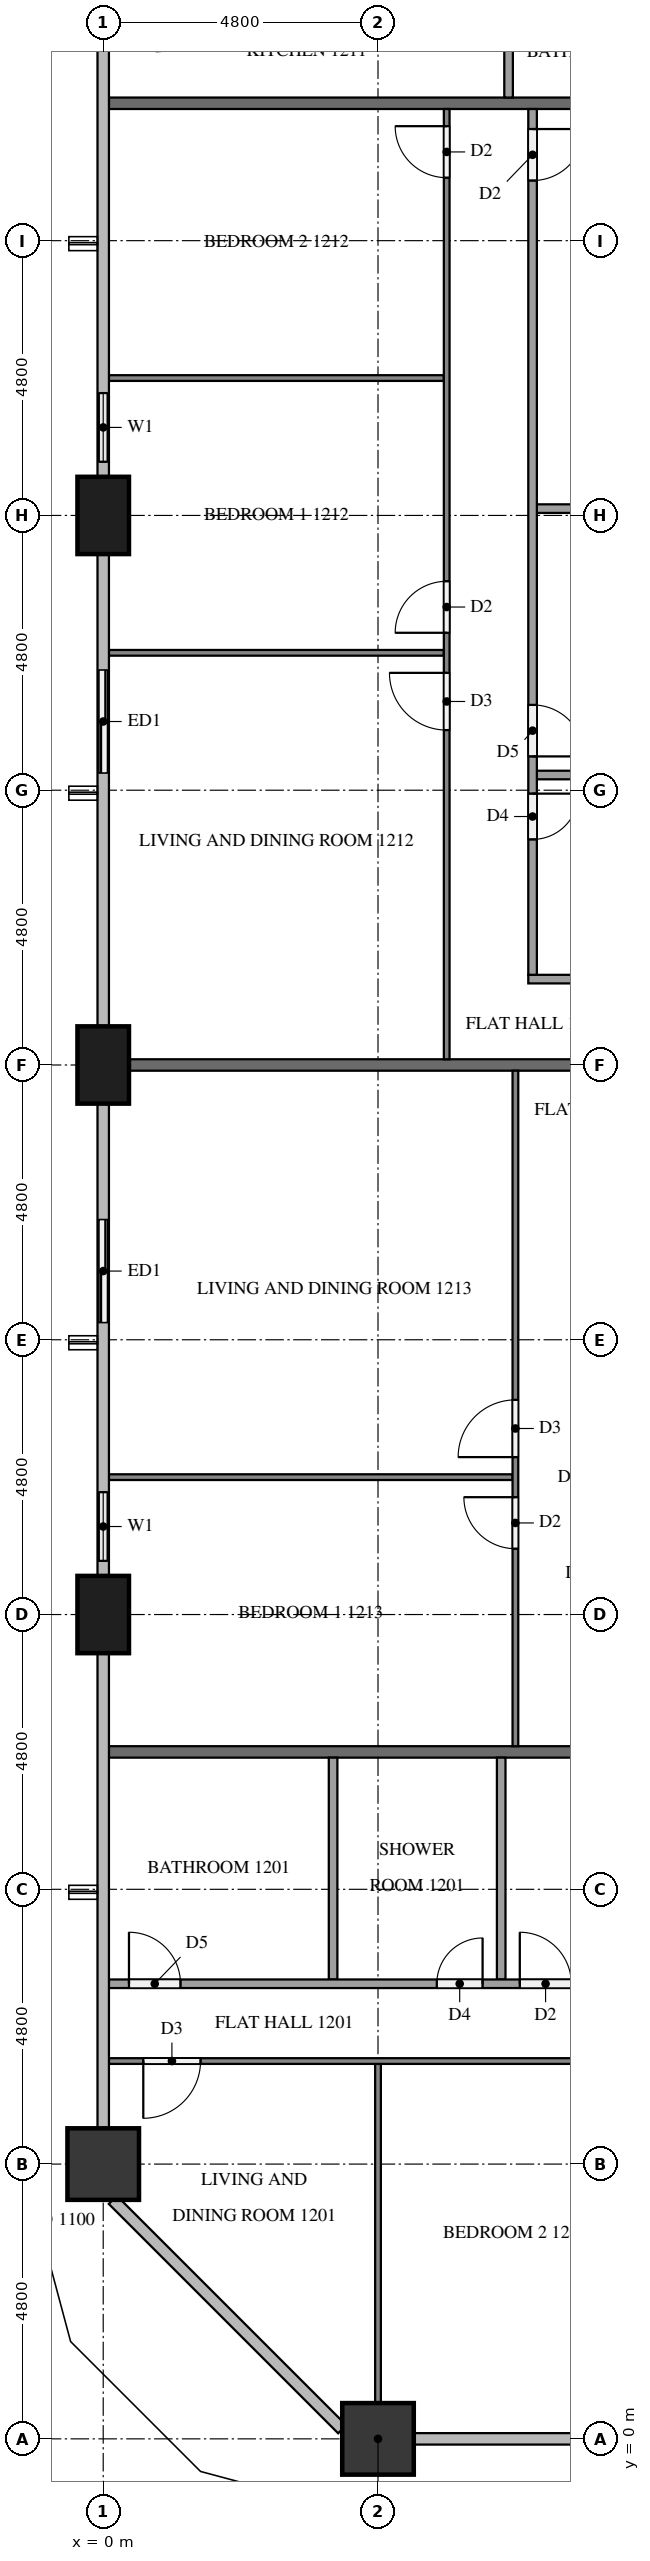
"""IFC4 building model, lengths in metres.
Left out: names, types, materials, properties, quantities, classifications, styles, units other than length and angle.
Written with IfcOpenShell. Run it as: python <this file> out.ifc"""

import sys

from ifc_helpers import new_model, si_unit, direction, frame, frame_2d, origin, origin_2d, place, context, subcontext, project, spatial, rectangle, extrude, element, fill, save


model = new_model("IFC4")
c1 = context("Model", 3, precision=1e-05, world=origin(), true_north=direction((0.0, 1.0)))
c2 = subcontext(c1, "Body", "Model", "MODEL_VIEW")
j1 = project(units=[si_unit("LENGTHUNIT", "METRE"), si_unit("PLANEANGLEUNIT", "RADIAN")], contexts=[c1])
p1 = place(None, origin())
s1 = spatial("IfcSite", under=j1, at=p1, CompositionType="ELEMENT")
p2 = place(p1, origin())
s2 = spatial("IfcBuilding", under=s1, at=p2, CompositionType="ELEMENT")
p3 = place(p2, frame((0.0, 0.0, 50.4)))
s3 = spatial("IfcBuildingStorey", under=s2, at=p3, CompositionType="ELEMENT", Elevation=50.4)
p4 = place(p3, frame((4.8, 0.0, 0.0), z_axis=(0.0, 0.0, 1.0), x_axis=(1.0, 0.0, 0.0)))
e1 = element("IfcColumn", 1, at=p4, inside=s3, PredefinedType="COLUMN", context=c2, shape_type="SweptSolid", body=[
    extrude(rectangle(XDim=1.25, YDim=1.25, at=origin_2d()), origin(), (0.0, 0.0, 1.0), 3.1),
])
for number, where, z_axis, x_axis in (
    (2, (0.0, 33.6, 0.0), (0.0, 0.0, 1.0), (0.0, 1.0, 0.0)),
    (3, (0.0, 24.0, 0.0), (0.0, 0.0, 1.0), (0.0, 1.0, 0.0)),
    (4, (0.0, 14.4, 0.0), (0.0, 0.0, 1.0), (0.0, 1.0, 0.0)),
):
    element("IfcColumn", number, at=place(p3, frame(where, z_axis=z_axis, x_axis=x_axis)), inside=s3, PredefinedType="COLUMN", context=c2, shape_type="SweptSolid", body=[
        extrude(rectangle(XDim=1.35, YDim=0.9, at=origin_2d()), origin(), (0.0, 0.0, 1.0), 3.1),
    ])
p5 = place(p3, frame((0.0, 4.8, 0.0), z_axis=(0.0, 0.0, 1.0), x_axis=(1.0, 0.0, 0.0)))
e5 = element("IfcColumn", 5, at=p5, inside=s3, PredefinedType="COLUMN", context=c2, shape_type="SweptSolid", body=[
    extrude(rectangle(XDim=1.25, YDim=1.25, at=origin_2d()), origin(), (0.0, 0.0, 1.0), 3.1),
])
p6 = place(p3, frame((0.0, 36.0, 0.0), z_axis=(0.0, 0.0, 1.0), x_axis=(0.0, -1.0, 0.0)))
e6 = element("IfcWall", 6, at=p6, inside=s3, PredefinedType="SOLIDWALL", context=c2, shape_type="SweptSolid", body=[
    extrude(rectangle(XDim=1.725, YDim=0.15, at=frame_2d((0.863, 0.0))), origin(), (0.0, 0.0, 1.0), 3.1),
])
p7 = place(p6, frame((0.262, 0.0, 0.9)))
e7 = element("IfcOpeningElement", 7, at=p7, cuts=e6, PredefinedType="OPENING", context=c2, shape_type="SweptSolid", body=[
    extrude(rectangle(XDim=1.2, YDim=1.4, at=frame_2d((0.6, 0.7))), frame((0.0, 0.085, 0.0), z_axis=(0.0, -1.0, 0.0), x_axis=(1.0, 0.0, 0.0)), (0.0, 0.0, 1.0), 0.17),
])
p8 = place(p3, frame((0.0, 31.2, 0.0), z_axis=(0.0, 0.0, 1.0), x_axis=(0.0, -1.0, 0.0)))
e8 = element("IfcWall", 8, at=p8, inside=s3, PredefinedType="SOLIDWALL", context=c2, shape_type="SweptSolid", body=[
    extrude(rectangle(XDim=2.4, YDim=0.15, at=frame_2d((1.2, 0.0))), origin(), (0.0, 0.0, 1.0), 3.1),
])
p9 = place(p8, frame((0.3, 0.0, 0.0)))
e9 = element("IfcOpeningElement", 9, at=p9, cuts=e8, PredefinedType="OPENING", context=c2, shape_type="SweptSolid", body=[
    extrude(rectangle(XDim=1.8, YDim=2.4, at=frame_2d((0.9, 1.2))), frame((0.0, 0.085, 0.0), z_axis=(0.0, -1.0, 0.0), x_axis=(1.0, 0.0, 0.0)), (0.0, 0.0, 1.0), 0.17),
])
p10 = place(p3, frame((0.0, 21.6, 0.0), z_axis=(0.0, 0.0, 1.0), x_axis=(0.0, -1.0, 0.0)))
e10 = element("IfcWall", 10, at=p10, inside=s3, PredefinedType="SOLIDWALL", context=c2, shape_type="SweptSolid", body=[
    extrude(rectangle(XDim=2.4, YDim=0.15, at=frame_2d((1.2, 0.0))), origin(), (0.0, 0.0, 1.0), 3.1),
])
p11 = place(p10, frame((0.3, 0.0, 0.0)))
e11 = element("IfcOpeningElement", 11, at=p11, cuts=e10, PredefinedType="OPENING", context=c2, shape_type="SweptSolid", body=[
    extrude(rectangle(XDim=1.8, YDim=2.4, at=frame_2d((0.9, 1.2))), frame((0.0, 0.085, 0.0), z_axis=(0.0, -1.0, 0.0), x_axis=(1.0, 0.0, 0.0)), (0.0, 0.0, 1.0), 0.17),
])
p12 = place(p3, frame((0.0, 16.8, 0.0), z_axis=(0.0, 0.0, 1.0), x_axis=(0.0, -1.0, 0.0)))
e12 = element("IfcWall", 12, at=p12, inside=s3, PredefinedType="SOLIDWALL", context=c2, shape_type="SweptSolid", body=[
    extrude(rectangle(XDim=1.725, YDim=0.15, at=frame_2d((0.863, 0.0))), origin(), (0.0, 0.0, 1.0), 3.1),
])
p13 = place(p12, frame((0.262, 0.0, 0.9)))
e13 = element("IfcOpeningElement", 13, at=p13, cuts=e12, PredefinedType="OPENING", context=c2, shape_type="SweptSolid", body=[
    extrude(rectangle(XDim=1.2, YDim=1.4, at=frame_2d((0.6, 0.7))), frame((0.0, 0.085, 0.0), z_axis=(0.0, -1.0, 0.0), x_axis=(1.0, 0.0, 0.0)), (0.0, 0.0, 1.0), 0.17),
])
for number, where, z_axis, x_axis in (
    (14, (0.1, 12.0, 0.0), (0.0, 0.0, 1.0), (1.0, 0.0, 0.0)),
    (15, (0.1, 40.8, 0.0), (0.0, 0.0, 1.0), (1.0, 0.0, 0.0)),
):
    element("IfcWall", number, at=place(p3, frame(where, z_axis=z_axis, x_axis=x_axis)), inside=s3, PredefinedType="PARTITIONING", context=c2, shape_type="SweptSolid", body=[
        extrude(rectangle(XDim=11.8, YDim=0.2, at=frame_2d((5.9, 0.0))), origin(), (0.0, 0.0, 1.0), 3.1),
    ])
p14 = place(p3, frame((0.45, 24.0, 0.0), z_axis=(0.0, 0.0, 1.0), x_axis=(1.0, 0.0, 0.0)))
e16 = element("IfcWall", 16, at=p14, inside=s3, PredefinedType="PARTITIONING", context=c2, shape_type="SweptSolid", body=[
    extrude(rectangle(XDim=11.45, YDim=0.2, at=frame_2d((5.725, 0.0))), origin(), (0.0, 0.0, 1.0), 3.1),
])
p15 = place(p3, frame((4.8, 6.55, 0.0), z_axis=(0.0, 0.0, 1.0), x_axis=(0.0, -1.0, 0.0)))
e17 = element("IfcWall", 17, at=p15, inside=s3, PredefinedType="PARTITIONING", context=c2, shape_type="SweptSolid", body=[
    extrude(rectangle(XDim=5.925, YDim=0.1, at=frame_2d((2.962, 0.0))), origin(), (0.0, 0.0, 1.0), 3.1),
])
p16 = place(p3, frame((14.3, 6.6, 0.0), z_axis=(0.0, 0.0, 1.0), x_axis=(-1.0, 0.0, 0.0)))
e18 = element("IfcWall", 18, at=p16, inside=s3, PredefinedType="PARTITIONING", context=c2, shape_type="SweptSolid", body=[
    extrude(rectangle(XDim=14.2, YDim=0.1, at=frame_2d((7.1, 0.0))), origin(), (0.0, 0.0, 1.0), 3.1),
])
p17 = place(p16, frame((3.45, 0.0, 0.0)))
e19 = element("IfcOpeningElement", 19, at=p17, cuts=e18, PredefinedType="OPENING", context=c2, shape_type="SweptSolid", body=[
    extrude(rectangle(XDim=0.9, YDim=2.1, at=frame_2d((0.45, 1.05))), frame((0.0, 0.06, 0.0), z_axis=(0.0, -1.0, 0.0), x_axis=(1.0, 0.0, 0.0)), (0.0, 0.0, 1.0), 0.12),
])
p18 = place(p16, frame((5.05, 0.0, 0.0)))
e20 = element("IfcOpeningElement", 20, at=p18, cuts=e18, PredefinedType="OPENING", context=c2, shape_type="SweptSolid", body=[
    extrude(rectangle(XDim=0.9, YDim=2.1, at=frame_2d((0.45, 1.05))), frame((0.0, 0.06, 0.0), z_axis=(0.0, -1.0, 0.0), x_axis=(1.0, 0.0, 0.0)), (0.0, 0.0, 1.0), 0.12),
])
p19 = place(p16, frame((12.6, 0.0, 0.0)))
e21 = element("IfcOpeningElement", 21, at=p19, cuts=e18, PredefinedType="OPENING", context=c2, shape_type="SweptSolid", body=[
    extrude(rectangle(XDim=1.0, YDim=2.1, at=frame_2d((0.5, 1.05))), frame((0.0, 0.06, 0.0), z_axis=(0.0, -1.0, 0.0), x_axis=(1.0, 0.0, 0.0)), (0.0, 0.0, 1.0), 0.12),
])
for number, where, z_axis, x_axis in (
    (22, (6.952, 11.9, 0.0), (0.0, 0.0, 1.0), (0.0, -1.0, 0.0)),
    (23, (4.015, 11.9, 0.0), (0.0, 0.0, 1.0), (0.0, -1.0, 0.0)),
):
    element("IfcWall", number, at=place(p3, frame(where, z_axis=z_axis, x_axis=x_axis)), inside=s3, PredefinedType="PARTITIONING", context=c2, shape_type="SweptSolid", body=[
        extrude(rectangle(XDim=3.875, YDim=0.15, at=frame_2d((1.938, 0.0))), origin(), (0.0, 0.0, 1.0), 3.1),
    ])
p20 = place(p3, frame((0.1, 7.95, 0.0), z_axis=(0.0, 0.0, 1.0), x_axis=(1.0, 0.0, 0.0)))
e24 = element("IfcWall", 24, at=p20, inside=s3, PredefinedType="PARTITIONING", context=c2, shape_type="SweptSolid", body=[
    extrude(rectangle(XDim=12.725, YDim=0.15, at=frame_2d((6.362, 0.0))), origin(), (0.0, 0.0, 1.0), 3.1),
])
p21 = place(p20, frame((7.177, 0.0, 0.0)))
e25 = element("IfcOpeningElement", 25, at=p21, cuts=e24, PredefinedType="OPENING", context=c2, shape_type="SweptSolid", body=[
    extrude(rectangle(XDim=0.9, YDim=2.1, at=frame_2d((0.45, 1.05))), frame((0.0, 0.085, 0.0), z_axis=(0.0, -1.0, 0.0), x_axis=(1.0, 0.0, 0.0)), (0.0, 0.0, 1.0), 0.17),
])
p22 = place(p20, frame((5.727, 0.0, 0.0)))
e26 = element("IfcOpeningElement", 26, at=p22, cuts=e24, PredefinedType="OPENING", context=c2, shape_type="SweptSolid", body=[
    extrude(rectangle(XDim=0.8, YDim=2.1, at=frame_2d((0.4, 1.05))), frame((0.0, 0.085, 0.0), z_axis=(0.0, -1.0, 0.0), x_axis=(1.0, 0.0, 0.0)), (0.0, 0.0, 1.0), 0.17),
])
p23 = place(p20, frame((0.35, 0.0, 0.0)))
e27 = element("IfcOpeningElement", 27, at=p23, cuts=e24, PredefinedType="OPENING", context=c2, shape_type="SweptSolid", body=[
    extrude(rectangle(XDim=0.9, YDim=2.1, at=frame_2d((0.45, 1.05))), frame((0.0, 0.085, 0.0), z_axis=(0.0, -1.0, 0.0), x_axis=(1.0, 0.0, 0.0)), (0.0, 0.0, 1.0), 0.17),
])
p24 = place(p3, frame((7.081, 40.9, 0.0), z_axis=(0.0, 0.0, 1.0), x_axis=(0.0, 1.0, 0.0)))
e28 = element("IfcWall", 28, at=p24, inside=s3, PredefinedType="PARTITIONING", context=c2, shape_type="SweptSolid", body=[
    extrude(rectangle(XDim=1.625, YDim=0.15, at=frame_2d((0.812, 0.0))), origin(), (0.0, 0.0, 1.0), 3.1),
])
for number, where, z_axis, x_axis in (
    (29, (5.95, 31.2, 0.0), (0.0, 0.0, 1.0), (-1.0, 0.0, 0.0)),
    (30, (5.95, 36.0, 0.0), (0.0, 0.0, 1.0), (-1.0, 0.0, 0.0)),
):
    element("IfcWall", number, at=place(p3, frame(where, z_axis=z_axis, x_axis=x_axis)), inside=s3, PredefinedType="PARTITIONING", context=c2, shape_type="SweptSolid", body=[
        extrude(rectangle(XDim=5.85, YDim=0.1, at=frame_2d((2.925, 0.0))), origin(), (0.0, 0.0, 1.0), 3.1),
    ])
p25 = place(p3, frame((6.0, 24.1, 0.0), z_axis=(0.0, 0.0, 1.0), x_axis=(0.0, 1.0, 0.0)))
e31 = element("IfcWall", 31, at=p25, inside=s3, PredefinedType="PARTITIONING", context=c2, shape_type="SweptSolid", body=[
    extrude(rectangle(XDim=16.6, YDim=0.1, at=frame_2d((8.3, 0.0))), origin(), (0.0, 0.0, 1.0), 3.1),
])
p26 = place(p25, frame((5.75, 0.0, 0.0)))
e32 = element("IfcOpeningElement", 32, at=p26, cuts=e31, PredefinedType="OPENING", context=c2, shape_type="SweptSolid", body=[
    extrude(rectangle(XDim=1.0, YDim=2.1, at=frame_2d((0.5, 1.05))), frame((0.0, 0.06, 0.0), z_axis=(0.0, -1.0, 0.0), x_axis=(1.0, 0.0, 0.0)), (0.0, 0.0, 1.0), 0.12),
])
p27 = place(p25, frame((7.45, 0.0, 0.0)))
e33 = element("IfcOpeningElement", 33, at=p27, cuts=e31, PredefinedType="OPENING", context=c2, shape_type="SweptSolid", body=[
    extrude(rectangle(XDim=0.9, YDim=2.1, at=frame_2d((0.45, 1.05))), frame((0.0, 0.06, 0.0), z_axis=(0.0, -1.0, 0.0), x_axis=(1.0, 0.0, 0.0)), (0.0, 0.0, 1.0), 0.12),
])
p28 = place(p25, frame((15.4, 0.0, 0.0)))
e34 = element("IfcOpeningElement", 34, at=p28, cuts=e31, PredefinedType="OPENING", context=c2, shape_type="SweptSolid", body=[
    extrude(rectangle(XDim=0.9, YDim=2.1, at=frame_2d((0.45, 1.05))), frame((0.0, 0.06, 0.0), z_axis=(0.0, -1.0, 0.0), x_axis=(1.0, 0.0, 0.0)), (0.0, 0.0, 1.0), 0.12),
])
for number, where, z_axis, x_axis in (
    (35, (11.9, 29.065, 0.0), (0.0, 0.0, 1.0), (-1.0, 0.0, 0.0)),
    (36, (11.9, 33.719, 0.0), (0.0, 0.0, 1.0), (-1.0, 0.0, 0.0)),
):
    element("IfcWall", number, at=place(p3, frame(where, z_axis=z_axis, x_axis=x_axis)), inside=s3, PredefinedType="PARTITIONING", context=c2, shape_type="SweptSolid", body=[
        extrude(rectangle(XDim=4.325, YDim=0.15, at=frame_2d((2.163, 0.0))), origin(), (0.0, 0.0, 1.0), 3.1),
    ])
p29 = place(p3, frame((11.9, 25.5, 0.0), z_axis=(0.0, 0.0, 1.0), x_axis=(-1.0, 0.0, 0.0)))
e37 = element("IfcWall", 37, at=p29, inside=s3, PredefinedType="PARTITIONING", context=c2, shape_type="SweptSolid", body=[
    extrude(rectangle(XDim=4.475, YDim=0.15, at=frame_2d((2.237, 0.0))), origin(), (0.0, 0.0, 1.0), 3.1),
])
p30 = place(p3, frame((7.5, 40.7, 0.0), z_axis=(0.0, 0.0, 1.0), x_axis=(0.0, -1.0, 0.0)))
e38 = element("IfcWall", 38, at=p30, inside=s3, PredefinedType="PARTITIONING", context=c2, shape_type="SweptSolid", body=[
    extrude(rectangle(XDim=15.125, YDim=0.15, at=frame_2d((7.562, 0.0))), origin(), (0.0, 0.0, 1.0), 3.1),
])
p31 = place(p30, frame((11.96, 0.0, 0.0)))
e39 = element("IfcOpeningElement", 39, at=p31, cuts=e38, PredefinedType="OPENING", context=c2, shape_type="SweptSolid", body=[
    extrude(rectangle(XDim=0.8, YDim=2.1, at=frame_2d((0.4, 1.05))), frame((0.0, 0.085, 0.0), z_axis=(0.0, -1.0, 0.0), x_axis=(1.0, 0.0, 0.0)), (0.0, 0.0, 1.0), 0.17),
])
p32 = place(p30, frame((10.41, 0.0, 0.0)))
e40 = element("IfcOpeningElement", 40, at=p32, cuts=e38, PredefinedType="OPENING", context=c2, shape_type="SweptSolid", body=[
    extrude(rectangle(XDim=0.9, YDim=2.1, at=frame_2d((0.45, 1.05))), frame((0.0, 0.085, 0.0), z_axis=(0.0, -1.0, 0.0), x_axis=(1.0, 0.0, 0.0)), (0.0, 0.0, 1.0), 0.17),
])
p33 = place(p30, frame((0.35, 0.0, 0.0)))
e41 = element("IfcOpeningElement", 41, at=p33, cuts=e38, PredefinedType="OPENING", context=c2, shape_type="SweptSolid", body=[
    extrude(rectangle(XDim=0.9, YDim=2.1, at=frame_2d((0.45, 1.05))), frame((0.0, 0.085, 0.0), z_axis=(0.0, -1.0, 0.0), x_axis=(1.0, 0.0, 0.0)), (0.0, 0.0, 1.0), 0.17),
])
p34 = place(p3, frame((7.15, 16.8, 0.0), z_axis=(0.0, 0.0, 1.0), x_axis=(-1.0, 0.0, 0.0)))
e42 = element("IfcWall", 42, at=p34, inside=s3, PredefinedType="PARTITIONING", context=c2, shape_type="SweptSolid", body=[
    extrude(rectangle(XDim=7.05, YDim=0.1, at=frame_2d((3.525, 0.0))), origin(), (0.0, 0.0, 1.0), 3.1),
])
p35 = place(p3, frame((7.2, 12.1, 0.0), z_axis=(0.0, 0.0, 1.0), x_axis=(0.0, 1.0, 0.0)))
e43 = element("IfcWall", 43, at=p35, inside=s3, PredefinedType="PARTITIONING", context=c2, shape_type="SweptSolid", body=[
    extrude(rectangle(XDim=11.8, YDim=0.1, at=frame_2d((5.9, 0.0))), origin(), (0.0, 0.0, 1.0), 3.1),
])
p36 = place(p35, frame((5.05, 0.0, 0.0)))
e44 = element("IfcOpeningElement", 44, at=p36, cuts=e43, PredefinedType="OPENING", context=c2, shape_type="SweptSolid", body=[
    extrude(rectangle(XDim=1.0, YDim=2.1, at=frame_2d((0.5, 1.05))), frame((0.0, 0.06, 0.0), z_axis=(0.0, -1.0, 0.0), x_axis=(1.0, 0.0, 0.0)), (0.0, 0.0, 1.0), 0.12),
])
p37 = place(p35, frame((3.45, 0.0, 0.0)))
e45 = element("IfcOpeningElement", 45, at=p37, cuts=e43, PredefinedType="OPENING", context=c2, shape_type="SweptSolid", body=[
    extrude(rectangle(XDim=0.9, YDim=2.1, at=frame_2d((0.45, 1.05))), frame((0.0, 0.06, 0.0), z_axis=(0.0, -1.0, 0.0), x_axis=(1.0, 0.0, 0.0)), (0.0, 0.0, 1.0), 0.12),
])
p38 = place(p7, origin())
e46 = element("IfcWindow", 46, at=p38, inside=s3, PartitioningType="SINGLE_PANEL", PredefinedType="WINDOW", context=c2, shape_type="SweptSolid", body=[
    extrude(rectangle(XDim=1.2, YDim=1.4, at=frame_2d((0.6, 0.7))), frame((0.0, 0.03, 0.0), z_axis=(0.0, -1.0, 0.0), x_axis=(1.0, 0.0, 0.0)), (0.0, 0.0, 1.0), 0.06),
])
fill(e7, e46)
p39 = place(p9, origin())
e47 = element("IfcDoor", 47, at=p39, inside=s3, OperationType="SLIDING_TO_LEFT", PredefinedType="DOOR", context=c2, shape_type="SweptSolid", body=[
    extrude(rectangle(XDim=1.8, YDim=2.4, at=frame_2d((0.9, 1.2))), frame((0.0, 0.025, 0.0), z_axis=(0.0, -1.0, 0.0), x_axis=(1.0, 0.0, 0.0)), (0.0, 0.0, 1.0), 0.05),
])
fill(e9, e47)
p40 = place(p11, origin())
e48 = element("IfcDoor", 48, at=p40, inside=s3, OperationType="SLIDING_TO_RIGHT", PredefinedType="DOOR", context=c2, shape_type="SweptSolid", body=[
    extrude(rectangle(XDim=1.8, YDim=2.4, at=frame_2d((0.9, 1.2))), frame((0.0, 0.025, 0.0), z_axis=(0.0, -1.0, 0.0), x_axis=(1.0, 0.0, 0.0)), (0.0, 0.0, 1.0), 0.05),
])
fill(e11, e48)
p41 = place(p13, origin())
e49 = element("IfcWindow", 49, at=p41, inside=s3, PartitioningType="SINGLE_PANEL", PredefinedType="WINDOW", context=c2, shape_type="SweptSolid", body=[
    extrude(rectangle(XDim=1.2, YDim=1.4, at=frame_2d((0.6, 0.7))), frame((0.0, 0.03, 0.0), z_axis=(0.0, -1.0, 0.0), x_axis=(1.0, 0.0, 0.0)), (0.0, 0.0, 1.0), 0.06),
])
fill(e13, e49)
p42 = place(p19, origin())
e50 = element("IfcDoor", 50, at=p42, inside=s3, OperationType="SINGLE_SWING_RIGHT", PredefinedType="DOOR", context=c2, shape_type="SweptSolid", body=[
    extrude(rectangle(XDim=1.0, YDim=2.1, at=frame_2d((0.5, 1.05))), frame((0.0, 0.025, 0.0), z_axis=(0.0, -1.0, 0.0), x_axis=(1.0, 0.0, 0.0)), (0.0, 0.0, 1.0), 0.05),
])
fill(e21, e50)
p43 = place(p21, origin())
e51 = element("IfcDoor", 51, at=p43, inside=s3, OperationType="SINGLE_SWING_LEFT", PredefinedType="DOOR", context=c2, shape_type="SweptSolid", body=[
    extrude(rectangle(XDim=0.9, YDim=2.1, at=frame_2d((0.45, 1.05))), frame((0.0, 0.025, 0.0), z_axis=(0.0, -1.0, 0.0), x_axis=(1.0, 0.0, 0.0)), (0.0, 0.0, 1.0), 0.05),
])
fill(e25, e51)
p44 = place(p22, origin())
e52 = element("IfcDoor", 52, at=p44, inside=s3, OperationType="SINGLE_SWING_RIGHT", PredefinedType="DOOR", context=c2, shape_type="SweptSolid", body=[
    extrude(rectangle(XDim=0.8, YDim=2.1, at=frame_2d((0.4, 1.05))), frame((0.0, 0.025, 0.0), z_axis=(0.0, -1.0, 0.0), x_axis=(1.0, 0.0, 0.0)), (0.0, 0.0, 1.0), 0.05),
])
fill(e26, e52)
p45 = place(p23, origin())
e53 = element("IfcDoor", 53, at=p45, inside=s3, OperationType="SINGLE_SWING_LEFT", PredefinedType="DOOR", context=c2, shape_type="SweptSolid", body=[
    extrude(rectangle(XDim=0.9, YDim=2.1, at=frame_2d((0.45, 1.05))), frame((0.0, 0.025, 0.0), z_axis=(0.0, -1.0, 0.0), x_axis=(1.0, 0.0, 0.0)), (0.0, 0.0, 1.0), 0.05),
])
fill(e27, e53)
p46 = place(p26, origin())
e54 = element("IfcDoor", 54, at=p46, inside=s3, OperationType="SINGLE_SWING_RIGHT", PredefinedType="DOOR", context=c2, shape_type="SweptSolid", body=[
    extrude(rectangle(XDim=1.0, YDim=2.1, at=frame_2d((0.5, 1.05))), frame((0.0, 0.025, 0.0), z_axis=(0.0, -1.0, 0.0), x_axis=(1.0, 0.0, 0.0)), (0.0, 0.0, 1.0), 0.05),
])
fill(e32, e54)
p47 = place(p27, origin())
e55 = element("IfcDoor", 55, at=p47, inside=s3, OperationType="SINGLE_SWING_LEFT", PredefinedType="DOOR", context=c2, shape_type="SweptSolid", body=[
    extrude(rectangle(XDim=0.9, YDim=2.1, at=frame_2d((0.45, 1.05))), frame((0.0, 0.025, 0.0), z_axis=(0.0, -1.0, 0.0), x_axis=(1.0, 0.0, 0.0)), (0.0, 0.0, 1.0), 0.05),
])
fill(e33, e55)
p48 = place(p28, origin())
e56 = element("IfcDoor", 56, at=p48, inside=s3, OperationType="SINGLE_SWING_RIGHT", PredefinedType="DOOR", context=c2, shape_type="SweptSolid", body=[
    extrude(rectangle(XDim=0.9, YDim=2.1, at=frame_2d((0.45, 1.05))), frame((0.0, 0.025, 0.0), z_axis=(0.0, -1.0, 0.0), x_axis=(1.0, 0.0, 0.0)), (0.0, 0.0, 1.0), 0.05),
])
fill(e34, e56)
p49 = place(p31, origin())
e57 = element("IfcDoor", 57, at=p49, inside=s3, OperationType="SINGLE_SWING_LEFT", PredefinedType="DOOR", context=c2, shape_type="SweptSolid", body=[
    extrude(rectangle(XDim=0.8, YDim=2.1, at=frame_2d((0.4, 1.05))), frame((0.0, 0.025, 0.0), z_axis=(0.0, -1.0, 0.0), x_axis=(1.0, 0.0, 0.0)), (0.0, 0.0, 1.0), 0.05),
])
fill(e39, e57)
p50 = place(p32, origin())
e58 = element("IfcDoor", 58, at=p50, inside=s3, OperationType="SINGLE_SWING_RIGHT", PredefinedType="DOOR", context=c2, shape_type="SweptSolid", body=[
    extrude(rectangle(XDim=0.9, YDim=2.1, at=frame_2d((0.45, 1.05))), frame((0.0, 0.025, 0.0), z_axis=(0.0, -1.0, 0.0), x_axis=(1.0, 0.0, 0.0)), (0.0, 0.0, 1.0), 0.05),
])
fill(e40, e58)
p51 = place(p33, origin())
e59 = element("IfcDoor", 59, at=p51, inside=s3, OperationType="SINGLE_SWING_LEFT", PredefinedType="DOOR", context=c2, shape_type="SweptSolid", body=[
    extrude(rectangle(XDim=0.9, YDim=2.1, at=frame_2d((0.45, 1.05))), frame((0.0, 0.025, 0.0), z_axis=(0.0, -1.0, 0.0), x_axis=(1.0, 0.0, 0.0)), (0.0, 0.0, 1.0), 0.05),
])
fill(e41, e59)
p52 = place(p36, origin())
e60 = element("IfcDoor", 60, at=p52, inside=s3, OperationType="SINGLE_SWING_LEFT", PredefinedType="DOOR", context=c2, shape_type="SweptSolid", body=[
    extrude(rectangle(XDim=1.0, YDim=2.1, at=frame_2d((0.5, 1.05))), frame((0.0, 0.025, 0.0), z_axis=(0.0, -1.0, 0.0), x_axis=(1.0, 0.0, 0.0)), (0.0, 0.0, 1.0), 0.05),
])
fill(e44, e60)
p53 = place(p37, origin())
e61 = element("IfcDoor", 61, at=p53, inside=s3, OperationType="SINGLE_SWING_RIGHT", PredefinedType="DOOR", context=c2, shape_type="SweptSolid", body=[
    extrude(rectangle(XDim=0.9, YDim=2.1, at=frame_2d((0.45, 1.05))), frame((0.0, 0.025, 0.0), z_axis=(0.0, -1.0, 0.0), x_axis=(1.0, 0.0, 0.0)), (0.0, 0.0, 1.0), 0.05),
])
fill(e45, e61)
save(model, sys.argv[1])
